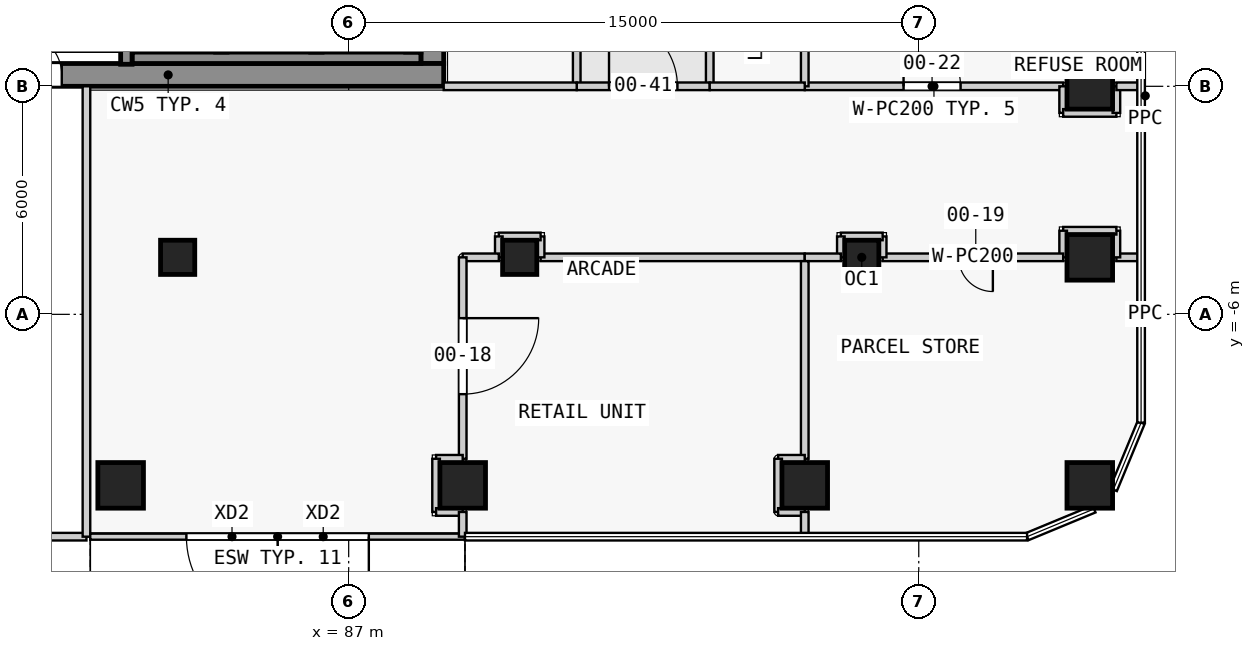
"""IFC4 building model, lengths in metres.
Left out: names, types, materials, properties, quantities, classifications, styles, units other than length and angle.
Written with IfcOpenShell. Run it as: python <this file> out.ifc"""

import sys

from ifc_helpers import new_model, si_unit, direction, frame, frame_2d, origin, origin_2d, place, context, subcontext, project, spatial, rectangle, extrude, element, fill, save


model = new_model("IFC4")
c1 = context("Model", 3, precision=1e-05, world=origin(), true_north=direction((0.0, 1.0)))
c2 = subcontext(c1, "Body", "Model", "MODEL_VIEW")
j1 = project(units=[si_unit("LENGTHUNIT", "METRE"), si_unit("PLANEANGLEUNIT", "RADIAN")], contexts=[c1])
p1 = place(None, origin())
s1 = spatial("IfcSite", under=j1, at=p1, CompositionType="ELEMENT")
p2 = place(p1, origin())
s2 = spatial("IfcBuilding", under=s1, at=p2, CompositionType="ELEMENT")
p3 = place(p2, origin())
s3 = spatial("IfcBuildingStorey", under=s2, at=p3, CompositionType="ELEMENT", Elevation=0.0)
for number, where, z_axis, x_axis in (
    (1, (81.0, -10.5, 0.0), (0.0, 0.0, 1.0), (1.0, 0.0, 0.0)),
    (2, (90.0, -10.5, 0.0), (0.0, 0.0, 1.0), (1.0, 0.0, 0.0)),
    (3, (99.0, -10.5, 0.0), (0.0, 0.0, 1.0), (1.0, 0.0, 0.0)),
    (4, (106.5, -10.5, 0.0), (0.0, 0.0, 1.0), (1.0, 0.0, 0.0)),
    (5, (106.5, -4.5, 0.0), (0.0, 0.0, 1.0), (1.0, 0.0, 0.0)),
    (6, (106.5, 0.0, 0.0), (0.0, 0.0, 1.0), (1.0, 0.0, 0.0)),
):
    element("IfcColumn", number, at=place(p3, frame(where, z_axis=z_axis, x_axis=x_axis)), inside=s3, PredefinedType="COLUMN", context=c2, shape_type="SweptSolid", body=[
        extrude(rectangle(XDim=1.2, YDim=1.2, at=origin_2d()), origin(), (0.0, 0.0, 1.0), 8.0),
    ])
for number, where, z_axis, x_axis in (
    (7, (82.5, -4.5, 0.0), (0.0, 0.0, 1.0), (1.0, 0.0, 0.0)),
    (8, (91.5, -4.5, 0.0), (0.0, 0.0, 1.0), (1.0, 0.0, 0.0)),
    (9, (100.5, -4.5, 0.0), (0.0, 0.0, 1.0), (1.0, 0.0, 0.0)),
):
    element("IfcColumn", number, at=place(p3, frame(where, z_axis=z_axis, x_axis=x_axis)), inside=s3, PredefinedType="COLUMN", context=c2, shape_type="SweptSolid", body=[
        extrude(rectangle(XDim=0.9, YDim=0.9, at=origin_2d()), origin(), (0.0, 0.0, 1.0), 8.0),
    ])
p4 = place(p3, frame((75.0, 0.3, 0.0), z_axis=(0.0, 0.0, 1.0), x_axis=(1.0, 0.0, 0.0)))
e10 = element("IfcWall", 10, at=p4, inside=s3, PredefinedType="SHEAR", context=c2, shape_type="SweptSolid", body=[
    extrude(rectangle(XDim=14.5, YDim=0.6, at=frame_2d((7.25, 0.0))), origin(), (0.0, 0.0, 1.0), 7.65),
])
p5 = place(p4, frame((0.85, 0.0, 0.0)))
e11 = element("IfcOpeningElement", 11, at=p5, cuts=e10, PredefinedType="OPENING", context=c2, shape_type="SweptSolid", body=[
    extrude(rectangle(XDim=1.1, YDim=2.1, at=frame_2d((0.55, 1.05))), frame((0.0, 0.31, 0.0), z_axis=(0.0, -1.0, 0.0), x_axis=(1.0, 0.0, 0.0)), (0.0, 0.0, 1.0), 0.62),
])
p6 = place(p4, frame((3.35, 0.0, 0.0)))
e12 = element("IfcOpeningElement", 12, at=p6, cuts=e10, PredefinedType="OPENING", context=c2, shape_type="SweptSolid", body=[
    extrude(rectangle(XDim=1.1, YDim=2.1, at=frame_2d((0.55, 1.05))), frame((0.0, 0.31, 0.0), z_axis=(0.0, -1.0, 0.0), x_axis=(1.0, 0.0, 0.0)), (0.0, 0.0, 1.0), 0.62),
])
p7 = place(p3, frame((89.2, 0.6, 0.0), z_axis=(0.0, 0.0, 1.0), x_axis=(0.0, 1.0, 0.0)))
e13 = element("IfcWall", 13, at=p7, inside=s3, PredefinedType="SHEAR", context=c2, shape_type="SweptSolid", body=[
    extrude(rectangle(XDim=16.8, YDim=0.6, at=frame_2d((8.4, 0.0))), origin(), (0.0, 0.0, 1.0), 7.65),
])
p8 = place(p7, frame((7.5, 0.0, 0.0)))
e14 = element("IfcOpeningElement", 14, at=p8, cuts=e13, PredefinedType="OPENING", context=c2, shape_type="SweptSolid", body=[
    extrude(rectangle(XDim=1.8, YDim=2.1, at=frame_2d((0.9, 1.05))), frame((0.0, 0.31, 0.0), z_axis=(0.0, -1.0, 0.0), x_axis=(1.0, 0.0, 0.0)), (0.0, 0.0, 1.0), 0.62),
])
p9 = place(p3, frame((81.15, 0.58, 0.0), z_axis=(0.0, 0.0, 1.0), x_axis=(0.0, 1.0, 0.0)))
e15 = element("IfcWall", 15, at=p9, inside=s3, PredefinedType="SHEAR", context=c2, shape_type="SweptSolid", body=[
    extrude(rectangle(XDim=6.72, YDim=0.3, at=frame_2d((3.36, 0.0))), origin(), (0.0, 0.0, 1.0), 7.65),
])
p10 = place(p3, frame((81.3, 0.75, 0.0), z_axis=(0.0, 0.0, 1.0), x_axis=(1.0, 0.0, 0.0)))
e16 = element("IfcWall", 16, at=p10, inside=s3, PredefinedType="SHEAR", context=c2, shape_type="SweptSolid", body=[
    extrude(rectangle(XDim=7.6, YDim=0.3, at=frame_2d((3.8, 0.0))), origin(), (0.0, 0.0, 1.0), 7.65),
])
p11 = place(p3, frame((90.06, -11.85, 0.0), z_axis=(0.0, 0.0, 1.0), x_axis=(-1.0, 0.0, 0.0)))
e17 = element("IfcWall", 17, at=p11, inside=s3, PredefinedType="STANDARD", context=c2, shape_type="SweptSolid", body=[
    extrude(rectangle(XDim=9.86, YDim=0.16, at=frame_2d((4.93, 0.0))), origin(), (0.0, 0.0, 1.0), 7.65),
])
p12 = place(p11, frame((2.53, 0.0, 0.0)))
e18 = element("IfcOpeningElement", 18, at=p12, cuts=e17, PredefinedType="OPENING", context=c2, shape_type="SweptSolid", body=[
    extrude(rectangle(XDim=2.4, YDim=2.7, at=frame_2d((1.2, 1.35))), frame((0.0, 0.09, 0.0), z_axis=(0.0, -1.0, 0.0), x_axis=(1.0, 0.0, 0.0)), (0.0, 0.0, 1.0), 0.18),
])
p13 = place(p11, frame((4.93, 0.0, 0.0)))
e19 = element("IfcOpeningElement", 19, at=p13, cuts=e17, PredefinedType="OPENING", context=c2, shape_type="SweptSolid", body=[
    extrude(rectangle(XDim=2.4, YDim=2.7, at=frame_2d((1.2, 1.35))), frame((0.0, 0.09, 0.0), z_axis=(0.0, -1.0, 0.0), x_axis=(1.0, 0.0, 0.0)), (0.0, 0.0, 1.0), 0.18),
])
p14 = place(p3, frame((80.1, -11.85, 0.0), z_axis=(0.0, 0.0, 1.0), x_axis=(0.0, 1.0, 0.0)))
e20 = element("IfcWall", 20, at=p14, inside=s3, PredefinedType="PARTITIONING", context=c2, shape_type="SweptSolid", body=[
    extrude(rectangle(XDim=11.85, YDim=0.2, at=frame_2d((5.925, 0.0))), origin(), (0.0, 0.0, 1.0), 7.65),
])
p15 = place(p3, frame((77.7, -11.85, 0.0), z_axis=(0.0, 0.0, 1.0), x_axis=(1.0, 0.0, 0.0)))
e21 = element("IfcWall", 21, at=p15, inside=s3, PredefinedType="PARTITIONING", context=c2, shape_type="SweptSolid", body=[
    extrude(rectangle(XDim=2.4, YDim=0.2, at=frame_2d((1.2, 0.0))), origin(), (0.0, 0.0, 1.0), 7.65),
])
p16 = place(p3, frame((93.0, 22.5, 0.0), z_axis=(0.0, 0.0, 1.0), x_axis=(0.0, -1.0, 0.0)))
e22 = element("IfcWall", 22, at=p16, inside=s3, PredefinedType="PARTITIONING", context=c2, shape_type="SweptSolid", body=[
    extrude(rectangle(XDim=22.5, YDim=0.2, at=frame_2d((11.25, 0.0))), origin(), (0.0, 0.0, 1.0), 7.65),
])
p17 = place(p16, frame((10.35, 0.0, 0.0)))
e23 = element("IfcOpeningElement", 23, at=p17, cuts=e22, PredefinedType="OPENING", context=c2, shape_type="SweptSolid", body=[
    extrude(rectangle(XDim=1.8, YDim=2.1, at=frame_2d((0.9, 1.05))), frame((0.0, 0.11, 0.0), z_axis=(0.0, -1.0, 0.0), x_axis=(1.0, 0.0, 0.0)), (0.0, 0.0, 1.0), 0.22),
])
p18 = place(p3, frame((99.0, -4.5, 0.0), z_axis=(0.0, 0.0, 1.0), x_axis=(-1.0, 0.0, 0.0)))
e24 = element("IfcWall", 24, at=p18, inside=s3, PredefinedType="PARTITIONING", context=c2, shape_type="SweptSolid", body=[
    extrude(rectangle(XDim=6.95, YDim=0.2, at=frame_2d((3.475, 0.0))), origin(), (0.0, 0.0, 1.0), 7.65),
])
p19 = place(p3, frame((92.05, -4.5, 0.0), z_axis=(0.0, 0.0, 1.0), x_axis=(0.0, 1.0, 0.0)))
e25 = element("IfcWall", 25, at=p19, inside=s3, PredefinedType="PARTITIONING", context=c2, shape_type="SweptSolid", body=[
    extrude(rectangle(XDim=0.55, YDim=0.2, at=frame_2d((0.275, 0.0))), origin(), (0.0, 0.0, 1.0), 7.65),
])
p20 = place(p3, frame((92.05, -3.95, 0.0), z_axis=(0.0, 0.0, 1.0), x_axis=(-1.0, 0.0, 0.0)))
e26 = element("IfcWall", 26, at=p20, inside=s3, PredefinedType="PARTITIONING", context=c2, shape_type="SweptSolid", body=[
    extrude(rectangle(XDim=1.1, YDim=0.2, at=frame_2d((0.55, 0.0))), origin(), (0.0, 0.0, 1.0), 7.65),
])
p21 = place(p3, frame((90.95, -3.95, 0.0), z_axis=(0.0, 0.0, 1.0), x_axis=(0.0, -1.0, 0.0)))
e27 = element("IfcWall", 27, at=p21, inside=s3, PredefinedType="PARTITIONING", context=c2, shape_type="SweptSolid", body=[
    extrude(rectangle(XDim=0.55, YDim=0.2, at=frame_2d((0.275, 0.0))), origin(), (0.0, 0.0, 1.0), 7.65),
])
p22 = place(p3, frame((90.95, -4.5, 0.0), z_axis=(0.0, 0.0, 1.0), x_axis=(-1.0, 0.0, 0.0)))
e28 = element("IfcWall", 28, at=p22, inside=s3, PredefinedType="PARTITIONING", context=c2, shape_type="SweptSolid", body=[
    extrude(rectangle(XDim=0.95, YDim=0.2, at=frame_2d((0.475, 0.0))), origin(), (0.0, 0.0, 1.0), 7.65),
])
p23 = place(p3, frame((90.0, -4.5, 0.0), z_axis=(0.0, 0.0, 1.0), x_axis=(0.0, -1.0, 0.0)))
e29 = element("IfcWall", 29, at=p23, inside=s3, PredefinedType="PARTITIONING", context=c2, shape_type="SweptSolid", body=[
    extrude(rectangle(XDim=5.3, YDim=0.2, at=frame_2d((2.65, 0.0))), origin(), (0.0, 0.0, 1.0), 7.65),
])
p24 = place(p23, frame((1.6, 0.0, 0.0)))
e30 = element("IfcOpeningElement", 30, at=p24, cuts=e29, PredefinedType="OPENING", context=c2, shape_type="SweptSolid", body=[
    extrude(rectangle(XDim=2.0, YDim=2.4, at=frame_2d((1.0, 1.2))), frame((0.0, 0.11, 0.0), z_axis=(0.0, -1.0, 0.0), x_axis=(1.0, 0.0, 0.0)), (0.0, 0.0, 1.0), 0.22),
])
p25 = place(p3, frame((90.0, -9.8, 0.0), z_axis=(0.0, 0.0, 1.0), x_axis=(-1.0, 0.0, 0.0)))
e31 = element("IfcWall", 31, at=p25, inside=s3, PredefinedType="PARTITIONING", context=c2, shape_type="SweptSolid", body=[
    extrude(rectangle(XDim=0.7, YDim=0.2, at=frame_2d((0.35, 0.0))), origin(), (0.0, 0.0, 1.0), 7.65),
])
p26 = place(p3, frame((89.3, -9.8, 0.0), z_axis=(0.0, 0.0, 1.0), x_axis=(0.0, -1.0, 0.0)))
e32 = element("IfcWall", 32, at=p26, inside=s3, PredefinedType="PARTITIONING", context=c2, shape_type="SweptSolid", body=[
    extrude(rectangle(XDim=1.4, YDim=0.2, at=frame_2d((0.7, 0.0))), origin(), (0.0, 0.0, 1.0), 6.95),
])
p27 = place(p3, frame((89.3, -11.2, 0.0), z_axis=(0.0, 0.0, 1.0), x_axis=(1.0, 0.0, 0.0)))
e33 = element("IfcWall", 33, at=p27, inside=s3, PredefinedType="PARTITIONING", context=c2, shape_type="SweptSolid", body=[
    extrude(rectangle(XDim=0.7, YDim=0.2, at=frame_2d((0.35, 0.0))), origin(), (0.0, 0.0, 1.0), 7.65),
])
for number, where, z_axis, x_axis in (
    (34, (90.0, -11.2, 0.0), (0.0, 0.0, 1.0), (0.0, -1.0, 0.0)),
    (35, (107.85, -4.5, 0.0), (0.0, 0.0, 1.0), (-1.0, 0.0, 0.0)),
):
    element("IfcWall", number, at=place(p3, frame(where, z_axis=z_axis, x_axis=x_axis)), inside=s3, PredefinedType="PARTITIONING", context=c2, shape_type="SweptSolid", body=[
        extrude(rectangle(XDim=0.65, YDim=0.2, at=frame_2d((0.325, 0.0))), origin(), (0.0, 0.0, 1.0), 7.65),
    ])
p28 = place(p3, frame((107.2, -4.5, 0.0), z_axis=(0.0, 0.0, 1.0), x_axis=(0.0, 1.0, 0.0)))
e36 = element("IfcWall", 36, at=p28, inside=s3, PredefinedType="PARTITIONING", context=c2, shape_type="SweptSolid", body=[
    extrude(rectangle(XDim=0.7, YDim=0.2, at=frame_2d((0.35, 0.0))), origin(), (0.0, 0.0, 1.0), 7.65),
])
p29 = place(p3, frame((107.2, -3.8, 0.0), z_axis=(0.0, 0.0, 1.0), x_axis=(-1.0, 0.0, 0.0)))
e37 = element("IfcWall", 37, at=p29, inside=s3, PredefinedType="PARTITIONING", context=c2, shape_type="SweptSolid", body=[
    extrude(rectangle(XDim=1.4, YDim=0.2, at=frame_2d((0.7, 0.0))), origin(), (0.0, 0.0, 1.0), 6.95),
])
p30 = place(p3, frame((105.8, -3.8, 0.0), z_axis=(0.0, 0.0, 1.0), x_axis=(0.0, -1.0, 0.0)))
e38 = element("IfcWall", 38, at=p30, inside=s3, PredefinedType="PARTITIONING", context=c2, shape_type="SweptSolid", body=[
    extrude(rectangle(XDim=0.7, YDim=0.2, at=frame_2d((0.35, 0.0))), origin(), (0.0, 0.0, 1.0), 7.65),
])
p31 = place(p3, frame((105.8, -4.5, 0.0), z_axis=(0.0, 0.0, 1.0), x_axis=(-1.0, 0.0, 0.0)))
e39 = element("IfcWall", 39, at=p31, inside=s3, PredefinedType="PARTITIONING", context=c2, shape_type="SweptSolid", body=[
    extrude(rectangle(XDim=4.75, YDim=0.2, at=frame_2d((2.375, 0.0))), origin(), (0.0, 0.0, 1.0), 7.65),
])
p32 = place(p31, frame((1.85, 0.0, 0.0)))
e40 = element("IfcOpeningElement", 40, at=p32, cuts=e39, PredefinedType="OPENING", context=c2, shape_type="SweptSolid", body=[
    extrude(rectangle(XDim=0.9, YDim=2.1, at=frame_2d((0.45, 1.05))), frame((0.0, 0.11, 0.0), z_axis=(0.0, -1.0, 0.0), x_axis=(1.0, 0.0, 0.0)), (0.0, 0.0, 1.0), 0.22),
])
p33 = place(p3, frame((101.05, -4.5, 0.0), z_axis=(0.0, 0.0, 1.0), x_axis=(0.0, 1.0, 0.0)))
e41 = element("IfcWall", 41, at=p33, inside=s3, PredefinedType="PARTITIONING", context=c2, shape_type="SweptSolid", body=[
    extrude(rectangle(XDim=0.55, YDim=0.2, at=frame_2d((0.275, 0.0))), origin(), (0.0, 0.0, 1.0), 7.65),
])
p34 = place(p3, frame((101.05, -3.95, 0.0), z_axis=(0.0, 0.0, 1.0), x_axis=(-1.0, 0.0, 0.0)))
e42 = element("IfcWall", 42, at=p34, inside=s3, PredefinedType="PARTITIONING", context=c2, shape_type="SweptSolid", body=[
    extrude(rectangle(XDim=1.1, YDim=0.2, at=frame_2d((0.55, 0.0))), origin(), (0.0, 0.0, 1.0), 7.65),
])
p35 = place(p3, frame((99.95, -3.95, 0.0), z_axis=(0.0, 0.0, 1.0), x_axis=(0.0, -1.0, 0.0)))
e43 = element("IfcWall", 43, at=p35, inside=s3, PredefinedType="PARTITIONING", context=c2, shape_type="SweptSolid", body=[
    extrude(rectangle(XDim=0.55, YDim=0.2, at=frame_2d((0.275, 0.0))), origin(), (0.0, 0.0, 1.0), 7.65),
])
p36 = place(p3, frame((99.95, -4.5, 0.0), z_axis=(0.0, 0.0, 1.0), x_axis=(-1.0, 0.0, 0.0)))
e44 = element("IfcWall", 44, at=p36, inside=s3, PredefinedType="PARTITIONING", context=c2, shape_type="SweptSolid", body=[
    extrude(rectangle(XDim=0.95, YDim=0.2, at=frame_2d((0.475, 0.0))), origin(), (0.0, 0.0, 1.0), 7.65),
])
p37 = place(p3, frame((99.0, 0.0, 0.0), z_axis=(0.0, 0.0, 1.0), x_axis=(1.0, 0.0, 0.0)))
e45 = element("IfcWall", 45, at=p37, inside=s3, PredefinedType="PARTITIONING", context=c2, shape_type="SweptSolid", body=[
    extrude(rectangle(XDim=6.8, YDim=0.2, at=frame_2d((3.4, 0.0))), origin(), (0.0, 0.0, 1.0), 7.65),
])
p38 = place(p37, frame((2.6, 0.0, 0.0)))
e46 = element("IfcOpeningElement", 46, at=p38, cuts=e45, PredefinedType="OPENING", context=c2, shape_type="SweptSolid", body=[
    extrude(rectangle(XDim=1.5, YDim=2.1, at=frame_2d((0.75, 1.05))), frame((0.0, 0.11, 0.0), z_axis=(0.0, -1.0, 0.0), x_axis=(1.0, 0.0, 0.0)), (0.0, 0.0, 1.0), 0.22),
])
p39 = place(p3, frame((105.8, 0.0, 0.0), z_axis=(0.0, 0.0, 1.0), x_axis=(0.0, -1.0, 0.0)))
e47 = element("IfcWall", 47, at=p39, inside=s3, PredefinedType="PARTITIONING", context=c2, shape_type="SweptSolid", body=[
    extrude(rectangle(XDim=0.7, YDim=0.2, at=frame_2d((0.35, 0.0))), origin(), (0.0, 0.0, 1.0), 7.65),
])
p40 = place(p3, frame((105.8, -0.7, 0.0), z_axis=(0.0, 0.0, 1.0), x_axis=(1.0, 0.0, 0.0)))
e48 = element("IfcWall", 48, at=p40, inside=s3, PredefinedType="PARTITIONING", context=c2, shape_type="SweptSolid", body=[
    extrude(rectangle(XDim=1.4, YDim=0.2, at=frame_2d((0.7, 0.0))), origin(), (0.0, 0.0, 1.0), 6.95),
])
p41 = place(p3, frame((107.2, -0.7, 0.0), z_axis=(0.0, 0.0, 1.0), x_axis=(0.0, 1.0, 0.0)))
e49 = element("IfcWall", 49, at=p41, inside=s3, PredefinedType="PARTITIONING", context=c2, shape_type="SweptSolid", body=[
    extrude(rectangle(XDim=0.7, YDim=0.2, at=frame_2d((0.35, 0.0))), origin(), (0.0, 0.0, 1.0), 7.65),
])
p42 = place(p3, frame((107.2, 0.0, 0.0), z_axis=(0.0, 0.0, 1.0), x_axis=(1.0, 0.0, 0.0)))
e50 = element("IfcWall", 50, at=p42, inside=s3, PredefinedType="PARTITIONING", context=c2, shape_type="SweptSolid", body=[
    extrude(rectangle(XDim=0.65, YDim=0.2, at=frame_2d((0.325, 0.0))), origin(), (0.0, 0.0, 1.0), 7.65),
])
p43 = place(p3, frame((99.0, 10.0, 0.0), z_axis=(0.0, 0.0, 1.0), x_axis=(0.0, -1.0, 0.0)))
e51 = element("IfcWall", 51, at=p43, inside=s3, PredefinedType="PARTITIONING", context=c2, shape_type="SweptSolid", body=[
    extrude(rectangle(XDim=10.0, YDim=0.2, at=frame_2d((5.0, 0.0))), origin(), (0.0, 0.0, 1.0), 7.65),
])
p44 = place(p3, frame((99.0, -4.6, 0.0), z_axis=(0.0, 0.0, 1.0), x_axis=(0.0, -1.0, 0.0)))
e52 = element("IfcWall", 52, at=p44, inside=s3, PredefinedType="PARTITIONING", context=c2, shape_type="SweptSolid", body=[
    extrude(rectangle(XDim=5.2, YDim=0.2, at=frame_2d((2.6, 0.0))), origin(), (0.0, 0.0, 1.0), 7.65),
])
p45 = place(p3, frame((99.0, -9.8, 0.0), z_axis=(0.0, 0.0, 1.0), x_axis=(-1.0, 0.0, 0.0)))
e53 = element("IfcWall", 53, at=p45, inside=s3, PredefinedType="PARTITIONING", context=c2, shape_type="SweptSolid", body=[
    extrude(rectangle(XDim=0.7, YDim=0.2, at=frame_2d((0.35, 0.0))), origin(), (0.0, 0.0, 1.0), 7.65),
])
p46 = place(p3, frame((98.3, -9.8, 0.0), z_axis=(0.0, 0.0, 1.0), x_axis=(0.0, -1.0, 0.0)))
e54 = element("IfcWall", 54, at=p46, inside=s3, PredefinedType="PARTITIONING", context=c2, shape_type="SweptSolid", body=[
    extrude(rectangle(XDim=1.4, YDim=0.2, at=frame_2d((0.7, 0.0))), origin(), (0.0, 0.0, 1.0), 6.95),
])
p47 = place(p3, frame((98.3, -11.2, 0.0), z_axis=(0.0, 0.0, 1.0), x_axis=(1.0, 0.0, 0.0)))
e55 = element("IfcWall", 55, at=p47, inside=s3, PredefinedType="PARTITIONING", context=c2, shape_type="SweptSolid", body=[
    extrude(rectangle(XDim=0.7, YDim=0.2, at=frame_2d((0.35, 0.0))), origin(), (0.0, 0.0, 1.0), 7.65),
])
p48 = place(p3, frame((99.0, -11.2, 0.0), z_axis=(0.0, 0.0, 1.0), x_axis=(0.0, -1.0, 0.0)))
e56 = element("IfcWall", 56, at=p48, inside=s3, PredefinedType="PARTITIONING", context=c2, shape_type="SweptSolid", body=[
    extrude(rectangle(XDim=0.65, YDim=0.2, at=frame_2d((0.325, 0.0))), origin(), (0.0, 0.0, 1.0), 7.65),
])
p49 = place(p3, frame((96.5, 5.0, 0.0), z_axis=(0.0, 0.0, 1.0), x_axis=(0.0, -1.0, 0.0)))
e57 = element("IfcWall", 57, at=p49, inside=s3, PredefinedType="PARTITIONING", context=c2, shape_type="SweptSolid", body=[
    extrude(rectangle(XDim=5.0, YDim=0.2, at=frame_2d((2.5, 0.0))), origin(), (0.0, 0.0, 1.0), 7.65),
])
p50 = place(p49, frame((1.6, 0.0, 0.0)))
e58 = element("IfcOpeningElement", 58, at=p50, cuts=e57, PredefinedType="OPENING", context=c2, shape_type="SweptSolid", body=[
    extrude(rectangle(XDim=1.8, YDim=2.1, at=frame_2d((0.9, 1.05))), frame((0.0, 0.11, 0.0), z_axis=(0.0, -1.0, 0.0), x_axis=(1.0, 0.0, 0.0)), (0.0, 0.0, 1.0), 0.22),
])
p51 = place(p3, frame((93.0, 0.0, 0.0), z_axis=(0.0, 0.0, 1.0), x_axis=(1.0, 0.0, 0.0)))
e59 = element("IfcWall", 59, at=p51, inside=s3, PredefinedType="PARTITIONING", context=c2, shape_type="SweptSolid", body=[
    extrude(rectangle(XDim=3.5, YDim=0.2, at=frame_2d((1.75, 0.0))), origin(), (0.0, 0.0, 1.0), 7.65),
])
p52 = place(p51, frame((0.85, 0.0, 0.0)))
e60 = element("IfcOpeningElement", 60, at=p52, cuts=e59, PredefinedType="OPENING", context=c2, shape_type="SweptSolid", body=[
    extrude(rectangle(XDim=1.8, YDim=2.1, at=frame_2d((0.9, 1.05))), frame((0.0, 0.11, 0.0), z_axis=(0.0, -1.0, 0.0), x_axis=(1.0, 0.0, 0.0)), (0.0, 0.0, 1.0), 0.22),
])
p53 = place(p3, frame((89.5, 0.0, 0.0), z_axis=(0.0, 0.0, 1.0), x_axis=(1.0, 0.0, 0.0)))
e61 = element("IfcWall", 61, at=p53, inside=s3, PredefinedType="PARTITIONING", context=c2, shape_type="SweptSolid", body=[
    extrude(rectangle(XDim=3.5, YDim=0.2, at=frame_2d((1.75, 0.0))), origin(), (0.0, 0.0, 1.0), 7.65),
])
p54 = place(p3, frame((96.5, 0.0, 0.0), z_axis=(0.0, 0.0, 1.0), x_axis=(1.0, 0.0, 0.0)))
e62 = element("IfcWall", 62, at=p54, inside=s3, PredefinedType="PARTITIONING", context=c2, shape_type="SweptSolid", body=[
    extrude(rectangle(XDim=2.5, YDim=0.2, at=frame_2d((1.25, 0.0))), origin(), (0.0, 0.0, 1.0), 7.65),
])
p55 = place(p12, origin())
e63 = element("IfcDoor", 63, at=p55, inside=s3, OperationType="SINGLE_SWING_LEFT", PredefinedType="DOOR", context=c2, shape_type="SweptSolid", body=[
    extrude(rectangle(XDim=2.4, YDim=2.7, at=frame_2d((1.2, 1.35))), frame((0.0, 0.025, 0.0), z_axis=(0.0, -1.0, 0.0), x_axis=(1.0, 0.0, 0.0)), (0.0, 0.0, 1.0), 0.05),
])
fill(e18, e63)
p56 = place(p13, origin())
e64 = element("IfcDoor", 64, at=p56, inside=s3, OperationType="SINGLE_SWING_LEFT", PredefinedType="DOOR", context=c2, shape_type="SweptSolid", body=[
    extrude(rectangle(XDim=2.4, YDim=2.7, at=frame_2d((1.2, 1.35))), frame((0.0, 0.025, 0.0), z_axis=(0.0, -1.0, 0.0), x_axis=(1.0, 0.0, 0.0)), (0.0, 0.0, 1.0), 0.05),
])
fill(e19, e64)
p57 = place(p6, origin())
e65 = element("IfcDoor", 65, at=p57, inside=s3, OperationType="SINGLE_SWING_LEFT", PredefinedType="DOOR", context=c2, shape_type="SweptSolid", body=[
    extrude(rectangle(XDim=1.1, YDim=2.1, at=frame_2d((0.55, 1.05))), frame((0.0, 0.025, 0.0), z_axis=(0.0, -1.0, 0.0), x_axis=(1.0, 0.0, 0.0)), (0.0, 0.0, 1.0), 0.05),
])
fill(e12, e65)
p58 = place(p24, origin())
e66 = element("IfcDoor", 66, at=p58, inside=s3, OperationType="SINGLE_SWING_LEFT", PredefinedType="DOOR", context=c2, shape_type="SweptSolid", body=[
    extrude(rectangle(XDim=2.0, YDim=2.4, at=frame_2d((1.0, 1.2))), frame((0.0, 0.025, 0.0), z_axis=(0.0, -1.0, 0.0), x_axis=(1.0, 0.0, 0.0)), (0.0, 0.0, 1.0), 0.05),
])
fill(e30, e66)
p59 = place(p32, origin())
e67 = element("IfcDoor", 67, at=p59, inside=s3, OperationType="SINGLE_SWING_LEFT", PredefinedType="DOOR", context=c2, shape_type="SweptSolid", body=[
    extrude(rectangle(XDim=0.9, YDim=2.1, at=frame_2d((0.45, 1.05))), frame((0.0, 0.025, 0.0), z_axis=(0.0, -1.0, 0.0), x_axis=(1.0, 0.0, 0.0)), (0.0, 0.0, 1.0), 0.05),
])
fill(e40, e67)
p60 = place(p38, origin())
e68 = element("IfcDoor", 68, at=p60, inside=s3, OperationType="SINGLE_SWING_LEFT", PredefinedType="DOOR", context=c2, shape_type="SweptSolid", body=[
    extrude(rectangle(XDim=1.5, YDim=2.1, at=frame_2d((0.75, 1.05))), frame((0.0, 0.025, 0.0), z_axis=(0.0, -1.0, 0.0), x_axis=(1.0, 0.0, 0.0)), (0.0, 0.0, 1.0), 0.05),
])
fill(e46, e68)
p61 = place(p52, origin())
e69 = element("IfcDoor", 69, at=p61, inside=s3, OperationType="DOUBLE_DOOR_SINGLE_SWING", PredefinedType="DOOR", context=c2, shape_type="SweptSolid", body=[
    extrude(rectangle(XDim=1.8, YDim=2.1, at=frame_2d((0.9, 1.05))), frame((0.0, 0.025, 0.0), z_axis=(0.0, -1.0, 0.0), x_axis=(1.0, 0.0, 0.0)), (0.0, 0.0, 1.0), 0.05),
])
fill(e60, e69)
save(model, sys.argv[1])
